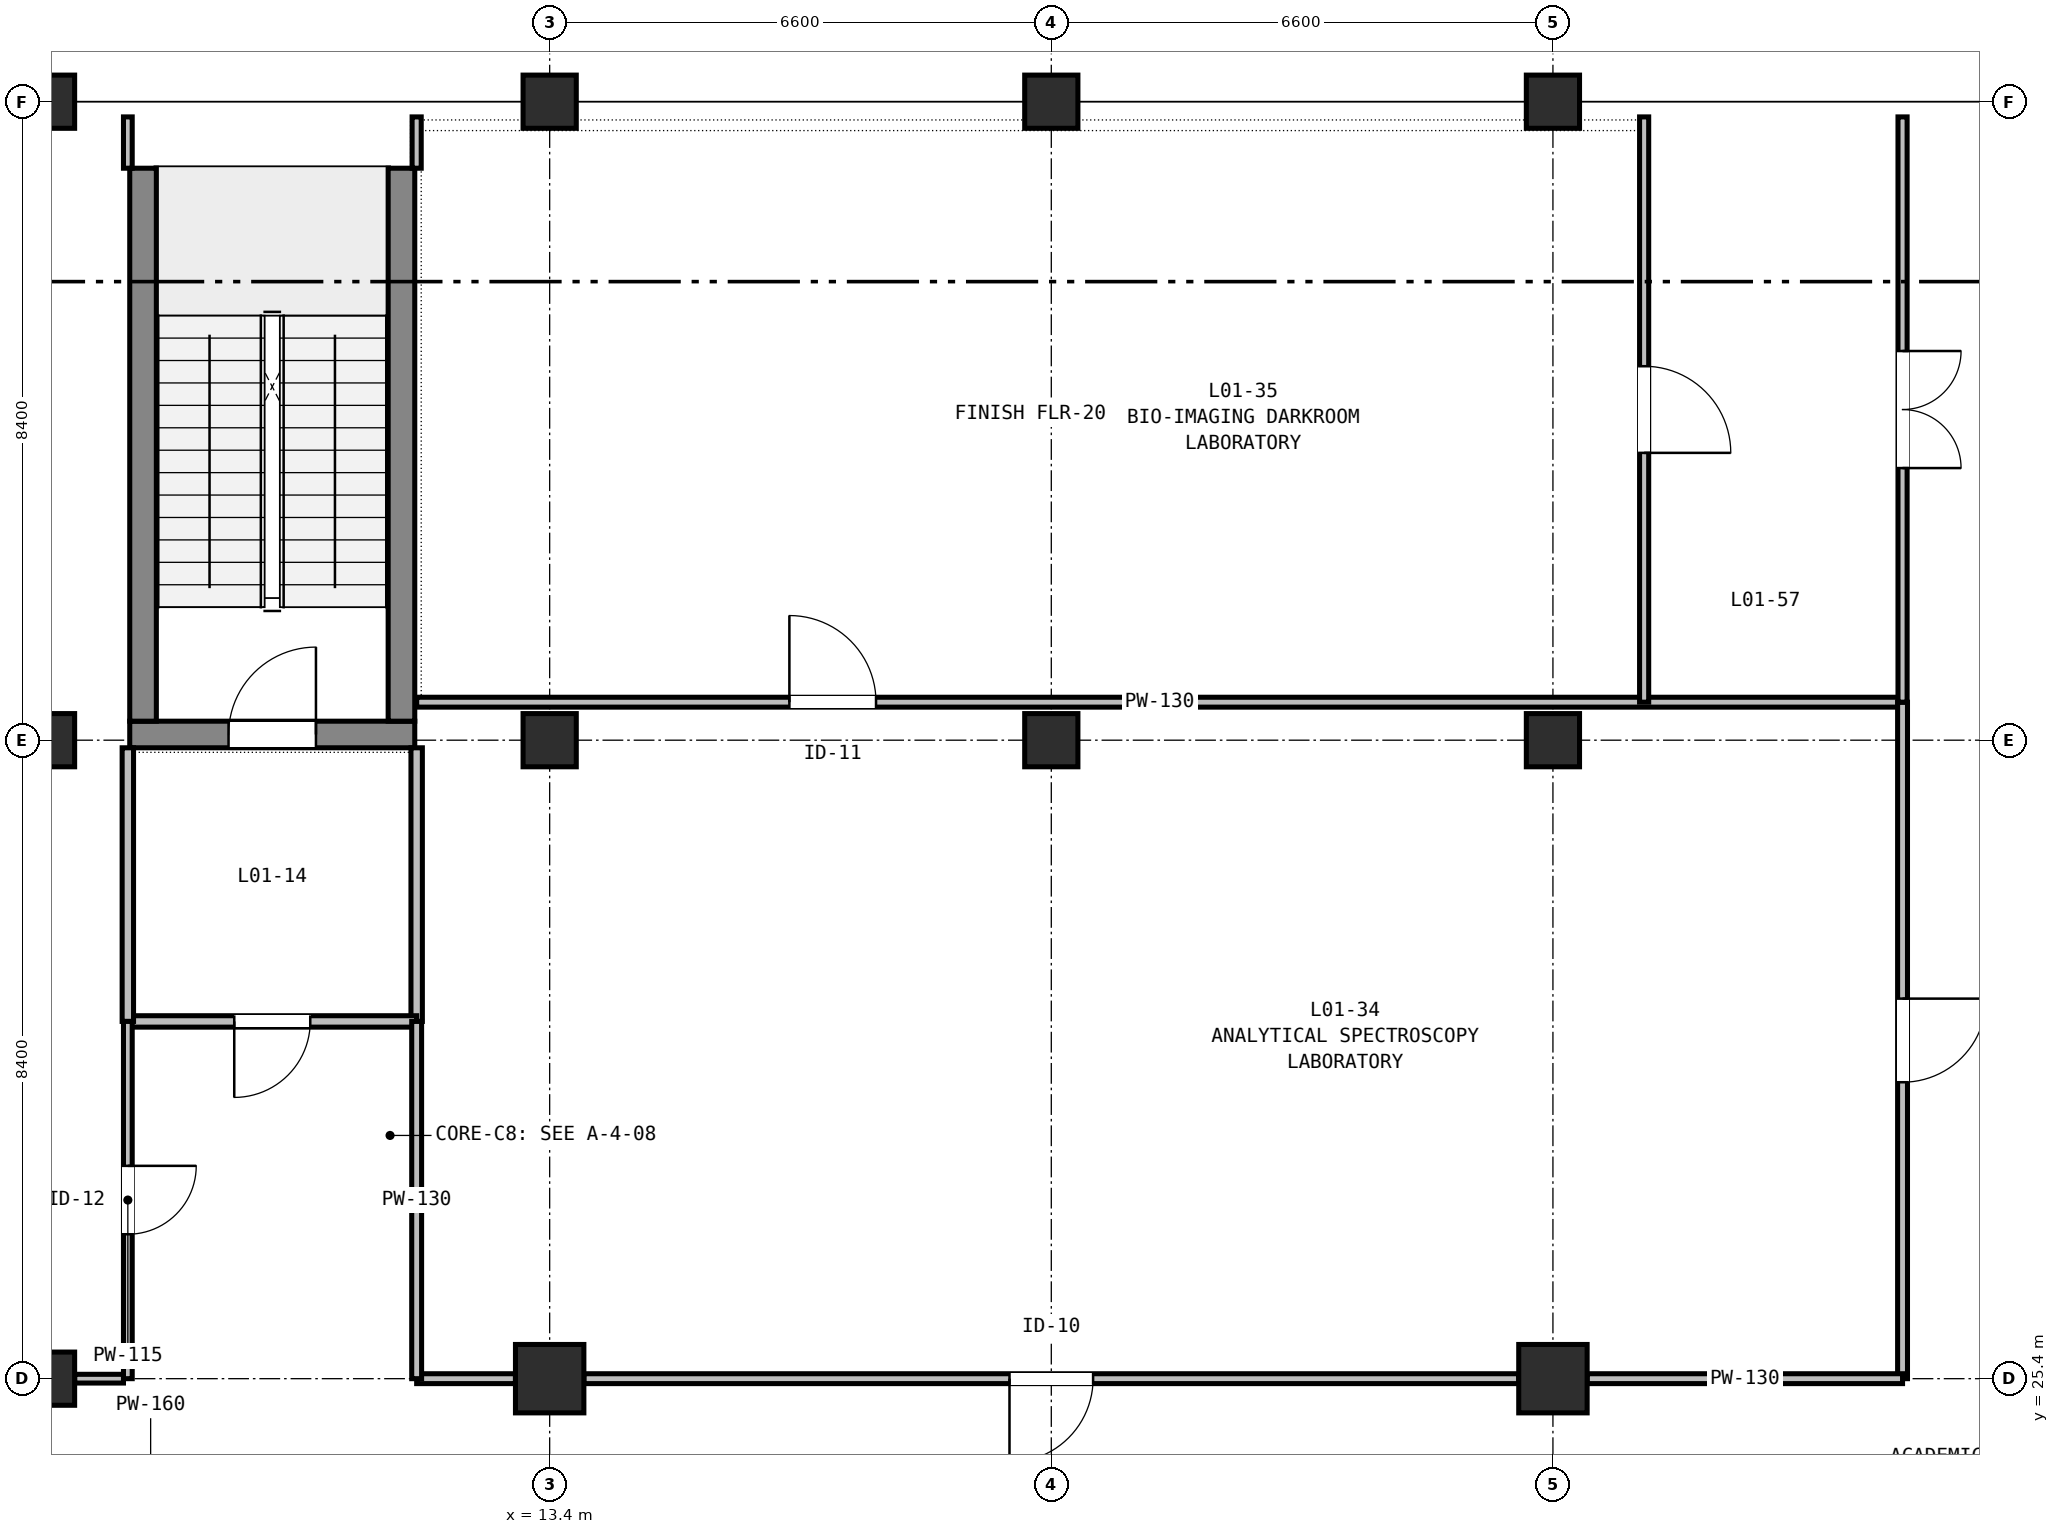
"""IFC4 building model, lengths in metres.
Left out: names, types, materials, properties, quantities, classifications, styles, units other than length and angle.
Written with IfcOpenShell. Run it as: python <this file> out.ifc"""

import sys

from ifc_helpers import new_model, si_unit, direction, frame, frame_2d, origin, origin_2d, place, context, subcontext, project, spatial, rectangle, extrude, element, fill, save


model = new_model("IFC4")
c1 = context("Model", 3, precision=1e-05, world=origin(), true_north=direction((0.0, 1.0)))
c2 = subcontext(c1, "Body", "Model", "MODEL_VIEW")
j1 = project(units=[si_unit("LENGTHUNIT", "METRE"), si_unit("PLANEANGLEUNIT", "RADIAN")], contexts=[c1])
p1 = place(None, origin())
s1 = spatial("IfcSite", under=j1, at=p1, CompositionType="ELEMENT")
p2 = place(p1, origin())
s2 = spatial("IfcBuilding", under=s1, at=p2, CompositionType="ELEMENT")
p3 = place(p2, frame((0.0, 0.0, 5.4)))
s3 = spatial("IfcBuildingStorey", under=s2, at=p3, CompositionType="ELEMENT", Elevation=5.4)
for number, where, z_axis, x_axis in (
    (1, (6.8, 25.4, 0.0), (0.0, 0.0, 1.0), (1.0, 0.0, 0.0)),
    (2, (6.8, 33.8, 0.0), (0.0, 0.0, 1.0), (1.0, 0.0, 0.0)),
    (3, (6.8, 42.2, 0.0), (0.0, 0.0, 1.0), (1.0, 0.0, 0.0)),
):
    element("IfcColumn", number, at=place(p3, frame(where, z_axis=z_axis, x_axis=x_axis)), inside=s3, PredefinedType="COLUMN", context=c2, shape_type="SweptSolid", body=[
        extrude(rectangle(XDim=0.7, YDim=0.7, at=origin_2d()), origin(), (0.0, 0.0, 1.0), 4.8),
    ])
p4 = place(p3, frame((13.4, 25.4, 0.0), z_axis=(0.0, 0.0, 1.0), x_axis=(1.0, 0.0, 0.0)))
e4 = element("IfcColumn", 4, at=p4, inside=s3, PredefinedType="COLUMN", context=c2, shape_type="SweptSolid", body=[
    extrude(rectangle(XDim=0.9, YDim=0.9, at=origin_2d()), origin(), (0.0, 0.0, 1.0), 4.8),
])
for number, where, z_axis, x_axis in (
    (5, (13.4, 33.8, 0.0), (0.0, 0.0, 1.0), (1.0, 0.0, 0.0)),
    (6, (13.4, 42.2, 0.0), (0.0, 0.0, 1.0), (1.0, 0.0, 0.0)),
    (7, (20.0, 33.8, 0.0), (0.0, 0.0, 1.0), (1.0, 0.0, 0.0)),
    (8, (20.0, 42.2, 0.0), (0.0, 0.0, 1.0), (1.0, 0.0, 0.0)),
):
    element("IfcColumn", number, at=place(p3, frame(where, z_axis=z_axis, x_axis=x_axis)), inside=s3, PredefinedType="COLUMN", context=c2, shape_type="SweptSolid", body=[
        extrude(rectangle(XDim=0.7, YDim=0.7, at=origin_2d()), origin(), (0.0, 0.0, 1.0), 4.8),
    ])
p5 = place(p3, frame((26.6, 25.4, 0.0), z_axis=(0.0, 0.0, 1.0), x_axis=(1.0, 0.0, 0.0)))
e9 = element("IfcColumn", 9, at=p5, inside=s3, PredefinedType="COLUMN", context=c2, shape_type="SweptSolid", body=[
    extrude(rectangle(XDim=0.9, YDim=0.9, at=origin_2d()), origin(), (0.0, 0.0, 1.0), 4.8),
])
for number, where, z_axis, x_axis in (
    (10, (26.6, 33.8, 0.0), (0.0, 0.0, 1.0), (1.0, 0.0, 0.0)),
    (11, (26.6, 42.2, 0.0), (0.0, 0.0, 1.0), (1.0, 0.0, 0.0)),
):
    element("IfcColumn", number, at=place(p3, frame(where, z_axis=z_axis, x_axis=x_axis)), inside=s3, PredefinedType="COLUMN", context=c2, shape_type="SweptSolid", body=[
        extrude(rectangle(XDim=0.7, YDim=0.7, at=origin_2d()), origin(), (0.0, 0.0, 1.0), 4.8),
    ])
p6 = place(p3, frame((7.875, 33.875, 0.0), z_axis=(0.0, 0.0, 1.0), x_axis=(1.0, 0.0, 0.0)))
e12 = element("IfcWall", 12, at=p6, inside=s3, PredefinedType="SHEAR", context=c2, shape_type="SweptSolid", body=[
    extrude(rectangle(XDim=3.75, YDim=0.35, at=frame_2d((1.875, 0.0))), origin(), (0.0, 0.0, 1.0), 4.8),
])
p7 = place(p6, frame((1.3, 0.0, 0.0)))
e13 = element("IfcOpeningElement", 13, at=p7, cuts=e12, PredefinedType="OPENING", context=c2, shape_type="SweptSolid", body=[
    extrude(rectangle(XDim=1.15, YDim=2.15, at=frame_2d((0.575, 1.075))), frame((0.0, 0.185, 0.0), z_axis=(0.0, -1.0, 0.0), x_axis=(1.0, 0.0, 0.0)), (0.0, 0.0, 1.0), 0.37),
])
p8 = place(p3, frame((7.875, 41.5, 0.0), z_axis=(0.0, 0.0, 1.0), x_axis=(1.0, 0.0, 0.0)))
e14 = element("IfcWall", 14, at=p8, inside=s3, PredefinedType="SHEAR", context=c2, shape_type="SweptSolid", body=[
    extrude(rectangle(XDim=3.75, YDim=0.35, at=frame_2d((1.875, 0.0))), origin(), (0.0, 0.0, 1.0), 4.8),
])
for number, where, z_axis, x_axis in (
    (15, (8.05, 34.05, 0.0), (0.0, 0.0, 1.0), (0.0, 1.0, 0.0)),
    (16, (11.45, 34.05, 0.0), (0.0, 0.0, 1.0), (0.0, 1.0, 0.0)),
):
    element("IfcWall", number, at=place(p3, frame(where, z_axis=z_axis, x_axis=x_axis)), inside=s3, PredefinedType="SHEAR", context=c2, shape_type="SweptSolid", body=[
        extrude(rectangle(XDim=7.275, YDim=0.35, at=frame_2d((3.637, 0.0))), origin(), (0.0, 0.0, 1.0), 4.8),
    ])
for number, where, z_axis, x_axis in (
    (17, (6.8, 42.04, 0.0), (0.0, 0.0, 1.0), (1.0, 0.0, 0.0)),
    (18, (12.88, 42.04, 0.0), (0.0, 0.0, 1.0), (1.0, 0.0, 0.0)),
    (19, (13.4, 42.04, 0.0), (0.0, 0.0, 1.0), (1.0, 0.0, 0.0)),
    (20, (19.48, 42.04, 0.0), (0.0, 0.0, 1.0), (1.0, 0.0, 0.0)),
    (21, (20.0, 42.04, 0.0), (0.0, 0.0, 1.0), (1.0, 0.0, 0.0)),
    (22, (26.08, 42.04, 0.0), (0.0, 0.0, 1.0), (1.0, 0.0, 0.0)),
    (23, (26.6, 42.04, 0.0), (0.0, 0.0, 1.0), (1.0, 0.0, 0.0)),
):
    element("IfcWall", number, at=place(p3, frame(where, z_axis=z_axis, x_axis=x_axis)), inside=s3, PredefinedType="STANDARD", context=c2, shape_type="SweptSolid", body=[
        extrude(rectangle(XDim=0.52, YDim=0.32, at=frame_2d((0.26, 0.0))), origin(), (0.0, 0.0, 1.0), 3.935),
    ])
p9 = place(p3, frame((11.65, 33.7, 0.0), z_axis=(0.0, 0.0, 1.0), x_axis=(0.0, -1.0, 0.0)))
e24 = element("IfcWall", 24, at=p9, inside=s3, PredefinedType="PARTITIONING", context=c2, shape_type="SweptSolid", body=[
    extrude(rectangle(XDim=3.6, YDim=0.15, at=frame_2d((1.8, 0.0))), origin(), (0.0, 0.0, 1.0), 4.135),
])
p10 = place(p3, frame((11.65, 30.1, 0.0), z_axis=(0.0, 0.0, 1.0), x_axis=(-1.0, 0.0, 0.0)))
e25 = element("IfcWall", 25, at=p10, inside=s3, PredefinedType="PARTITIONING", context=c2, shape_type="SweptSolid", body=[
    extrude(rectangle(XDim=3.8, YDim=0.15, at=frame_2d((1.9, 0.0))), origin(), (0.0, 0.0, 1.0), 4.285),
])
p11 = place(p10, frame((1.4, 0.0, 0.0)))
e26 = element("IfcOpeningElement", 26, at=p11, cuts=e25, PredefinedType="OPENING", context=c2, shape_type="SweptSolid", body=[
    extrude(rectangle(XDim=1.0, YDim=2.1, at=frame_2d((0.5, 1.05))), frame((0.0, 0.085, 0.0), z_axis=(0.0, -1.0, 0.0), x_axis=(1.0, 0.0, 0.0)), (0.0, 0.0, 1.0), 0.17),
])
p12 = place(p3, frame((7.85, 30.1, 0.0), z_axis=(0.0, 0.0, 1.0), x_axis=(0.0, 1.0, 0.0)))
e27 = element("IfcWall", 27, at=p12, inside=s3, PredefinedType="PARTITIONING", context=c2, shape_type="SweptSolid", body=[
    extrude(rectangle(XDim=3.6, YDim=0.15, at=frame_2d((1.8, 0.0))), origin(), (0.0, 0.0, 1.0), 4.135),
])
p13 = place(p3, frame((11.65, 34.3, 0.0), z_axis=(0.0, 0.0, 1.0), x_axis=(1.0, 0.0, 0.0)))
e28 = element("IfcWall", 28, at=p13, inside=s3, PredefinedType="PARTITIONING", context=c2, shape_type="SweptSolid", body=[
    extrude(rectangle(XDim=19.55, YDim=0.13, at=frame_2d((9.775, 0.0))), origin(), (0.0, 0.0, 1.0), 3.935),
])
p14 = place(p13, frame((4.904, 0.0, 0.0)))
e29 = element("IfcOpeningElement", 29, at=p14, cuts=e28, PredefinedType="OPENING", context=c2, shape_type="SweptSolid", body=[
    extrude(rectangle(XDim=1.14, YDim=2.06, at=frame_2d((0.57, 1.03))), frame((0.0, 0.075, 0.0), z_axis=(0.0, -1.0, 0.0), x_axis=(1.0, 0.0, 0.0)), (0.0, 0.0, 1.0), 0.15),
])
p15 = place(p3, frame((31.2, 34.3, 0.0), z_axis=(0.0, 0.0, 1.0), x_axis=(0.0, -1.0, 0.0)))
e30 = element("IfcWall", 30, at=p15, inside=s3, PredefinedType="PARTITIONING", context=c2, shape_type="SweptSolid", body=[
    extrude(rectangle(XDim=8.9, YDim=0.13, at=frame_2d((4.45, 0.0))), origin(), (0.0, 0.0, 1.0), 4.135),
])
p16 = place(p15, frame((3.9, 0.0, 0.0)))
e31 = element("IfcOpeningElement", 31, at=p16, cuts=e30, PredefinedType="OPENING", context=c2, shape_type="SweptSolid", body=[
    extrude(rectangle(XDim=1.1, YDim=2.06, at=frame_2d((0.55, 1.03))), frame((0.0, 0.075, 0.0), z_axis=(0.0, -1.0, 0.0), x_axis=(1.0, 0.0, 0.0)), (0.0, 0.0, 1.0), 0.15),
])
p17 = place(p3, frame((31.2, 25.4, 0.0), z_axis=(0.0, 0.0, 1.0), x_axis=(-1.0, 0.0, 0.0)))
e32 = element("IfcWall", 32, at=p17, inside=s3, PredefinedType="PARTITIONING", context=c2, shape_type="SweptSolid", body=[
    extrude(rectangle(XDim=4.15, YDim=0.13, at=frame_2d((2.075, 0.0))), origin(), (0.0, 0.0, 1.0), 4.135),
])
p18 = place(p3, frame((26.15, 25.4, 0.0), z_axis=(0.0, 0.0, 1.0), x_axis=(-1.0, 0.0, 0.0)))
e33 = element("IfcWall", 33, at=p18, inside=s3, PredefinedType="PARTITIONING", context=c2, shape_type="SweptSolid", body=[
    extrude(rectangle(XDim=12.3, YDim=0.13, at=frame_2d((6.15, 0.0))), origin(), (0.0, 0.0, 1.0), 3.385),
])
p19 = place(p18, frame((5.6, 0.0, 0.0)))
e34 = element("IfcOpeningElement", 34, at=p19, cuts=e33, PredefinedType="OPENING", context=c2, shape_type="SweptSolid", body=[
    extrude(rectangle(XDim=1.1, YDim=2.06, at=frame_2d((0.55, 1.03))), frame((0.0, 0.075, 0.0), z_axis=(0.0, -1.0, 0.0), x_axis=(1.0, 0.0, 0.0)), (0.0, 0.0, 1.0), 0.15),
])
p20 = place(p3, frame((12.95, 25.4, 0.0), z_axis=(0.0, 0.0, 1.0), x_axis=(-1.0, 0.0, 0.0)))
e35 = element("IfcWall", 35, at=p20, inside=s3, PredefinedType="PARTITIONING", context=c2, shape_type="SweptSolid", body=[
    extrude(rectangle(XDim=1.3, YDim=0.13, at=frame_2d((0.65, 0.0))), origin(), (0.0, 0.0, 1.0), 4.135),
])
p21 = place(p3, frame((11.65, 25.4, 0.0), z_axis=(0.0, 0.0, 1.0), x_axis=(0.0, 1.0, 0.0)))
e36 = element("IfcWall", 36, at=p21, inside=s3, PredefinedType="PARTITIONING", context=c2, shape_type="SweptSolid", body=[
    extrude(rectangle(XDim=4.7, YDim=0.13, at=frame_2d((2.35, 0.0))), origin(), (0.0, 0.0, 1.0), 4.135),
])
p22 = place(p3, frame((11.65, 41.325, 0.0), z_axis=(0.0, 0.0, 1.0), x_axis=(0.0, 1.0, 0.0)))
e37 = element("IfcWall", 37, at=p22, inside=s3, PredefinedType="PARTITIONING", context=c2, shape_type="SweptSolid", body=[
    extrude(rectangle(XDim=0.675, YDim=0.12, at=frame_2d((0.337, 0.0))), origin(), (0.0, 0.0, 1.0), 4.085),
])
p23 = place(p3, frame((27.8, 42.0, 0.0), z_axis=(0.0, 0.0, 1.0), x_axis=(0.0, -1.0, 0.0)))
e38 = element("IfcWall", 38, at=p23, inside=s3, PredefinedType="PARTITIONING", context=c2, shape_type="SweptSolid", body=[
    extrude(rectangle(XDim=7.7, YDim=0.12, at=frame_2d((3.85, 0.0))), origin(), (0.0, 0.0, 1.0), 4.085),
])
p24 = place(p23, frame((3.28, 0.0, 0.0)))
e39 = element("IfcOpeningElement", 39, at=p24, cuts=e38, PredefinedType="OPENING", context=c2, shape_type="SweptSolid", body=[
    extrude(rectangle(XDim=1.14, YDim=2.06, at=frame_2d((0.57, 1.03))), frame((0.0, 0.07, 0.0), z_axis=(0.0, -1.0, 0.0), x_axis=(1.0, 0.0, 0.0)), (0.0, 0.0, 1.0), 0.14),
])
p25 = place(p3, frame((7.85, 42.0, 0.0), z_axis=(0.0, 0.0, 1.0), x_axis=(0.0, -1.0, 0.0)))
e40 = element("IfcWall", 40, at=p25, inside=s3, PredefinedType="PARTITIONING", context=c2, shape_type="SweptSolid", body=[
    extrude(rectangle(XDim=0.675, YDim=0.115, at=frame_2d((0.337, 0.0))), origin(), (0.0, 0.0, 1.0), 4.085),
])
p26 = place(p3, frame((7.85, 30.1, 0.0), z_axis=(0.0, 0.0, 1.0), x_axis=(0.0, -1.0, 0.0)))
e41 = element("IfcWall", 41, at=p26, inside=s3, PredefinedType="PARTITIONING", context=c2, shape_type="SweptSolid", body=[
    extrude(rectangle(XDim=4.7, YDim=0.115, at=frame_2d((2.35, 0.0))), origin(), (0.0, 0.0, 1.0), 4.135),
])
p27 = place(p26, frame((1.9, 0.0, 0.0)))
e42 = element("IfcOpeningElement", 42, at=p27, cuts=e41, PredefinedType="OPENING", context=c2, shape_type="SweptSolid", body=[
    extrude(rectangle(XDim=0.9, YDim=2.1, at=frame_2d((0.45, 1.05))), frame((0.0, 0.067, 0.0), z_axis=(0.0, -1.0, 0.0), x_axis=(1.0, 0.0, 0.0)), (0.0, 0.0, 1.0), 0.135),
])
p28 = place(p3, frame((7.792, 25.4, 0.0), z_axis=(0.0, 0.0, 1.0), x_axis=(-1.0, 0.0, 0.0)))
e43 = element("IfcWall", 43, at=p28, inside=s3, PredefinedType="PARTITIONING", context=c2, shape_type="SweptSolid", body=[
    extrude(rectangle(XDim=0.643, YDim=0.115, at=frame_2d((0.321, 0.0))), origin(), (0.0, 0.0, 1.0), 4.135),
])
p29 = place(p3, frame((31.2, 42.0, 0.0), z_axis=(0.0, 0.0, 1.0), x_axis=(0.0, -1.0, 0.0)))
e44 = element("IfcWall", 44, at=p29, inside=s3, PredefinedType="PARTITIONING", context=c2, shape_type="SweptSolid", body=[
    extrude(rectangle(XDim=7.7, YDim=0.12, at=frame_2d((3.85, 0.0))), origin(), (0.0, 0.0, 1.0), 4.085),
])
p30 = place(p29, frame((3.08, 0.0, 0.0)))
e45 = element("IfcOpeningElement", 45, at=p30, cuts=e44, PredefinedType="OPENING", context=c2, shape_type="SweptSolid", body=[
    extrude(rectangle(XDim=1.54, YDim=2.2, at=frame_2d((0.77, 1.1))), frame((0.0, 0.07, 0.0), z_axis=(0.0, -1.0, 0.0), x_axis=(1.0, 0.0, 0.0)), (0.0, 0.0, 1.0), 0.14),
])
p31 = place(p7, origin())
e46 = element("IfcDoor", 46, at=p31, inside=s3, OperationType="SINGLE_SWING_RIGHT", PredefinedType="DOOR", context=c2, shape_type="SweptSolid", body=[
    extrude(rectangle(XDim=1.15, YDim=2.15, at=frame_2d((0.575, 1.075))), frame((0.0, 0.025, 0.0), z_axis=(0.0, -1.0, 0.0), x_axis=(1.0, 0.0, 0.0)), (0.0, 0.0, 1.0), 0.05),
])
fill(e13, e46)
p32 = place(p11, origin())
e47 = element("IfcDoor", 47, at=p32, inside=s3, OperationType="SINGLE_SWING_RIGHT", PredefinedType="DOOR", context=c2, shape_type="SweptSolid", body=[
    extrude(rectangle(XDim=1.0, YDim=2.1, at=frame_2d((0.5, 1.05))), frame((0.0, 0.025, 0.0), z_axis=(0.0, -1.0, 0.0), x_axis=(1.0, 0.0, 0.0)), (0.0, 0.0, 1.0), 0.05),
])
fill(e26, e47)
p33 = place(p19, origin())
e48 = element("IfcDoor", 48, at=p33, inside=s3, OperationType="SINGLE_SWING_RIGHT", PredefinedType="DOOR", context=c2, shape_type="SweptSolid", body=[
    extrude(rectangle(XDim=1.1, YDim=2.06, at=frame_2d((0.55, 1.03))), frame((0.0, 0.025, 0.0), z_axis=(0.0, -1.0, 0.0), x_axis=(1.0, 0.0, 0.0)), (0.0, 0.0, 1.0), 0.05),
])
fill(e34, e48)
p34 = place(p16, origin())
e49 = element("IfcDoor", 49, at=p34, inside=s3, OperationType="SINGLE_SWING_LEFT", PredefinedType="DOOR", context=c2, shape_type="SweptSolid", body=[
    extrude(rectangle(XDim=1.1, YDim=2.06, at=frame_2d((0.55, 1.03))), frame((0.0, 0.025, 0.0), z_axis=(0.0, -1.0, 0.0), x_axis=(1.0, 0.0, 0.0)), (0.0, 0.0, 1.0), 0.05),
])
fill(e31, e49)
p35 = place(p24, origin())
e50 = element("IfcDoor", 50, at=p35, inside=s3, OperationType="SINGLE_SWING_RIGHT", PredefinedType="DOOR", context=c2, shape_type="SweptSolid", body=[
    extrude(rectangle(XDim=1.14, YDim=2.06, at=frame_2d((0.57, 1.03))), frame((0.0, 0.025, 0.0), z_axis=(0.0, -1.0, 0.0), x_axis=(1.0, 0.0, 0.0)), (0.0, 0.0, 1.0), 0.05),
])
fill(e39, e50)
p36 = place(p14, origin())
e51 = element("IfcDoor", 51, at=p36, inside=s3, OperationType="SINGLE_SWING_LEFT", PredefinedType="DOOR", context=c2, shape_type="SweptSolid", body=[
    extrude(rectangle(XDim=1.14, YDim=2.06, at=frame_2d((0.57, 1.03))), frame((0.0, 0.025, 0.0), z_axis=(0.0, -1.0, 0.0), x_axis=(1.0, 0.0, 0.0)), (0.0, 0.0, 1.0), 0.05),
])
fill(e29, e51)
p37 = place(p27, origin())
e52 = element("IfcDoor", 52, at=p37, inside=s3, OperationType="SINGLE_SWING_LEFT", PredefinedType="DOOR", context=c2, shape_type="SweptSolid", body=[
    extrude(rectangle(XDim=0.9, YDim=2.1, at=frame_2d((0.45, 1.05))), frame((0.0, 0.025, 0.0), z_axis=(0.0, -1.0, 0.0), x_axis=(1.0, 0.0, 0.0)), (0.0, 0.0, 1.0), 0.05),
])
fill(e42, e52)
p38 = place(p30, origin())
e53 = element("IfcDoor", 53, at=p38, inside=s3, OperationType="DOUBLE_DOOR_SINGLE_SWING", PredefinedType="DOOR", context=c2, shape_type="SweptSolid", body=[
    extrude(rectangle(XDim=1.54, YDim=2.2, at=frame_2d((0.77, 1.1))), frame((0.0, 0.025, 0.0), z_axis=(0.0, -1.0, 0.0), x_axis=(1.0, 0.0, 0.0)), (0.0, 0.0, 1.0), 0.05),
])
fill(e45, e53)
save(model, sys.argv[1])
